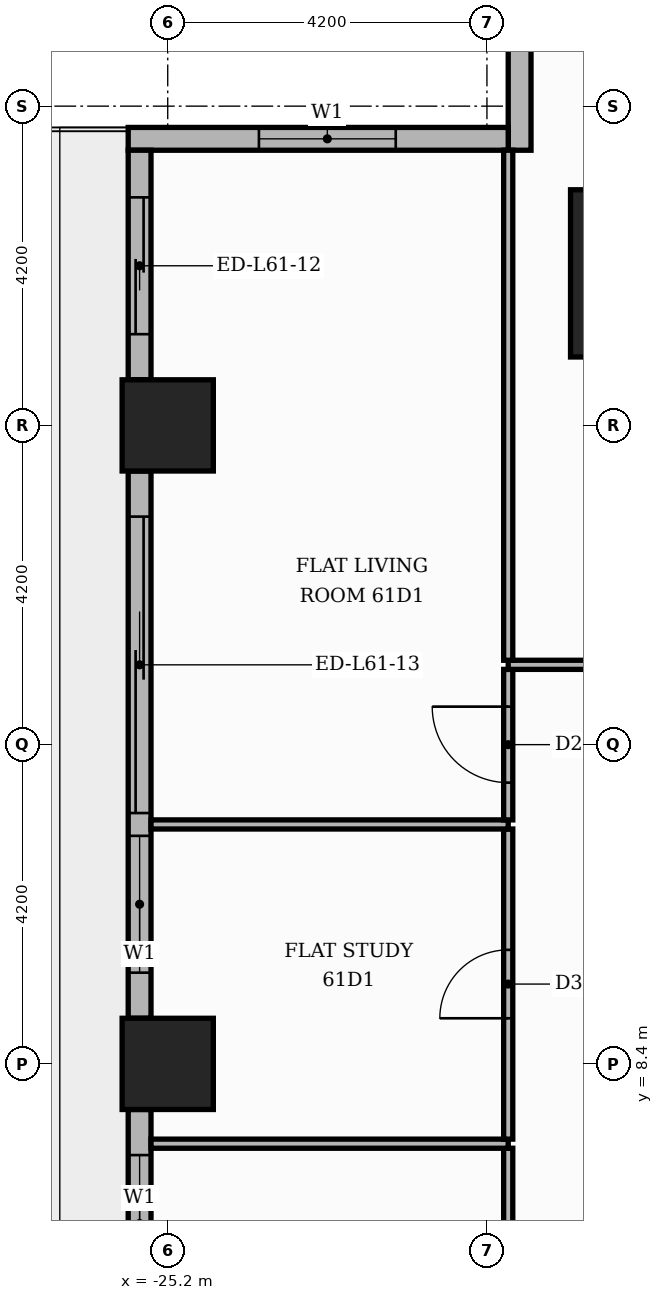
"""IFC4 building model, lengths in metres.
Left out: names, types, materials, properties, quantities, classifications, styles, units other than length and angle.
Written with IfcOpenShell. Run it as: python <this file> out.ifc"""

import sys

from ifc_helpers import new_model, si_unit, direction, frame, frame_2d, origin, origin_2d, place, context, subcontext, project, spatial, rectangle, extrude, element, fill, save


model = new_model("IFC4")
c1 = context("Model", 3, precision=1e-05, world=origin(), true_north=direction((0.0, 1.0)))
c2 = subcontext(c1, "Body", "Model", "MODEL_VIEW")
j1 = project(units=[si_unit("LENGTHUNIT", "METRE"), si_unit("PLANEANGLEUNIT", "RADIAN")], contexts=[c1])
p1 = place(None, origin())
s1 = spatial("IfcSite", under=j1, at=p1, CompositionType="ELEMENT")
p2 = place(p1, origin())
s2 = spatial("IfcBuilding", under=s1, at=p2, CompositionType="ELEMENT")
p3 = place(p2, frame((0.0, 0.0, 256.2)))
s3 = spatial("IfcBuildingStorey", under=s2, at=p3, CompositionType="ELEMENT", Elevation=256.2)
p4 = place(p3, frame((-18.8, 18.8, 0.0), z_axis=(0.0, 0.0, 1.0), x_axis=(1.0, 0.0, 0.0)))
e1 = element("IfcColumn", 1, at=p4, inside=s3, PredefinedType="COLUMN", context=c2, shape_type="SweptSolid", body=[
    extrude(rectangle(XDim=2.2, YDim=2.2, at=origin_2d()), origin(), (0.0, 0.0, 1.0), 3.9),
])
for number, where, z_axis, x_axis in (
    (2, (-25.2, 8.4, 0.0), (0.0, 0.0, 1.0), (1.0, 0.0, 0.0)),
    (3, (-25.2, 16.8, 0.0), (0.0, 0.0, 1.0), (1.0, 0.0, 0.0)),
):
    element("IfcColumn", number, at=place(p3, frame(where, z_axis=z_axis, x_axis=x_axis)), inside=s3, PredefinedType="COLUMN", context=c2, shape_type="SweptSolid", body=[
        extrude(rectangle(XDim=1.2, YDim=1.2, at=origin_2d()), origin(), (0.0, 0.0, 1.0), 3.9),
    ])
p5 = place(p3, frame((-20.57, 25.42, 0.0), z_axis=(0.0, 0.0, 1.0), x_axis=(0.0, -1.0, 0.0)))
e4 = element("IfcWall", 4, at=p5, inside=s3, PredefinedType="STANDARD", context=c2, shape_type="SweptSolid", body=[
    extrude(rectangle(XDim=5.0, YDim=0.3, at=frame_2d((2.5, 0.0))), origin(), (0.0, 0.0, 1.0), 3.48),
])
p6 = place(p5, frame((1.42, 0.0, 0.9)))
e5 = element("IfcOpeningElement", 5, at=p6, cuts=e4, PredefinedType="OPENING", context=c2, shape_type="SweptSolid", body=[
    extrude(rectangle(XDim=1.8, YDim=2.1, at=frame_2d((0.9, 1.05))), frame((0.0, 0.16, 0.0), z_axis=(0.0, -1.0, 0.0), x_axis=(1.0, 0.0, 0.0)), (0.0, 0.0, 1.0), 0.32),
])
p7 = place(p3, frame((-20.72, 20.57, 0.0), z_axis=(0.0, 0.0, 1.0), x_axis=(-1.0, 0.0, 0.0)))
e6 = element("IfcWall", 6, at=p7, inside=s3, PredefinedType="STANDARD", context=c2, shape_type="SweptSolid", body=[
    extrude(rectangle(XDim=5.0, YDim=0.3, at=frame_2d((2.5, 0.0))), origin(), (0.0, 0.0, 1.0), 3.48),
])
p8 = place(p7, frame((1.48, 0.0, 0.9)))
e7 = element("IfcOpeningElement", 7, at=p8, cuts=e6, PredefinedType="OPENING", context=c2, shape_type="SweptSolid", body=[
    extrude(rectangle(XDim=1.8, YDim=2.1, at=frame_2d((0.9, 1.05))), frame((0.0, 0.16, 0.0), z_axis=(0.0, -1.0, 0.0), x_axis=(1.0, 0.0, 0.0)), (0.0, 0.0, 1.0), 0.32),
])
p9 = place(p3, frame((-25.57, 20.42, 0.0), z_axis=(0.0, 0.0, 1.0), x_axis=(0.0, -1.0, 0.0)))
e8 = element("IfcWall", 8, at=p9, inside=s3, PredefinedType="STANDARD", context=c2, shape_type="SweptSolid", body=[
    extrude(rectangle(XDim=3.02, YDim=0.3, at=frame_2d((1.51, 0.0))), origin(), (0.0, 0.0, 1.0), 3.48),
])
p10 = place(p9, frame((0.62, 0.0, 0.0)))
e9 = element("IfcOpeningElement", 9, at=p10, cuts=e8, PredefinedType="OPENING", context=c2, shape_type="SweptSolid", body=[
    extrude(rectangle(XDim=1.8, YDim=2.4, at=frame_2d((0.9, 1.2))), frame((0.0, 0.16, 0.0), z_axis=(0.0, -1.0, 0.0), x_axis=(1.0, 0.0, 0.0)), (0.0, 0.0, 1.0), 0.32),
])
p11 = place(p3, frame((-25.57, 16.2, 0.0), z_axis=(0.0, 0.0, 1.0), x_axis=(0.0, -1.0, 0.0)))
e10 = element("IfcWall", 10, at=p11, inside=s3, PredefinedType="STANDARD", context=c2, shape_type="SweptSolid", body=[
    extrude(rectangle(XDim=7.2, YDim=0.3, at=frame_2d((3.6, 0.0))), origin(), (0.0, 0.0, 1.0), 3.48),
])
p12 = place(p11, frame((0.6, 0.0, 0.0)))
e11 = element("IfcOpeningElement", 11, at=p12, cuts=e10, PredefinedType="OPENING", context=c2, shape_type="SweptSolid", body=[
    extrude(rectangle(XDim=3.9, YDim=2.4, at=frame_2d((1.95, 1.2))), frame((0.0, 0.16, 0.0), z_axis=(0.0, -1.0, 0.0), x_axis=(1.0, 0.0, 0.0)), (0.0, 0.0, 1.0), 0.32),
])
p13 = place(p11, frame((4.8, 0.0, 0.9)))
e12 = element("IfcOpeningElement", 12, at=p13, cuts=e10, PredefinedType="OPENING", context=c2, shape_type="SweptSolid", body=[
    extrude(rectangle(XDim=1.8, YDim=2.1, at=frame_2d((0.9, 1.05))), frame((0.0, 0.16, 0.0), z_axis=(0.0, -1.0, 0.0), x_axis=(1.0, 0.0, 0.0)), (0.0, 0.0, 1.0), 0.32),
])
p14 = place(p3, frame((-25.57, 7.8, 0.0), z_axis=(0.0, 0.0, 1.0), x_axis=(0.0, -1.0, 0.0)))
e13 = element("IfcWall", 13, at=p14, inside=s3, PredefinedType="STANDARD", context=c2, shape_type="SweptSolid", body=[
    extrude(rectangle(XDim=7.2, YDim=0.3, at=frame_2d((3.6, 0.0))), origin(), (0.0, 0.0, 1.0), 3.48),
])
p15 = place(p14, frame((0.6, 0.0, 0.9)))
e14 = element("IfcOpeningElement", 14, at=p15, cuts=e13, PredefinedType="OPENING", context=c2, shape_type="SweptSolid", body=[
    extrude(rectangle(XDim=1.8, YDim=2.1, at=frame_2d((0.9, 1.05))), frame((0.0, 0.16, 0.0), z_axis=(0.0, -1.0, 0.0), x_axis=(1.0, 0.0, 0.0)), (0.0, 0.0, 1.0), 0.32),
])
p16 = place(p14, frame((2.7, 0.0, 0.0)))
e15 = element("IfcOpeningElement", 15, at=p16, cuts=e13, PredefinedType="OPENING", context=c2, shape_type="SweptSolid", body=[
    extrude(rectangle(XDim=1.8, YDim=2.4, at=frame_2d((0.9, 1.2))), frame((0.0, 0.16, 0.0), z_axis=(0.0, -1.0, 0.0), x_axis=(1.0, 0.0, 0.0)), (0.0, 0.0, 1.0), 0.32),
])
p17 = place(p14, frame((4.8, 0.0, 0.9)))
e16 = element("IfcOpeningElement", 16, at=p17, cuts=e13, PredefinedType="OPENING", context=c2, shape_type="SweptSolid", body=[
    extrude(rectangle(XDim=1.8, YDim=2.1, at=frame_2d((0.9, 1.05))), frame((0.0, 0.16, 0.0), z_axis=(0.0, -1.0, 0.0), x_axis=(1.0, 0.0, 0.0)), (0.0, 0.0, 1.0), 0.32),
])
p18 = place(p3, frame((-20.72, 3.21, 0.0), z_axis=(0.0, 0.0, 1.0), x_axis=(0.0, 1.0, 0.0)))
e17 = element("IfcWall", 17, at=p18, inside=s3, PredefinedType="PARTITIONING", context=c2, shape_type="SweptSolid", body=[
    extrude(rectangle(XDim=4.08, YDim=0.12, at=frame_2d((2.04, 0.0))), origin(), (0.0, 0.0, 1.0), 3.48),
])
p19 = place(p18, frame((1.59, 0.0, 0.0)))
e18 = element("IfcOpeningElement", 18, at=p19, cuts=e17, PredefinedType="OPENING", context=c2, shape_type="SweptSolid", body=[
    extrude(rectangle(XDim=0.9, YDim=2.1, at=frame_2d((0.45, 1.05))), frame((0.0, 0.07, 0.0), z_axis=(0.0, -1.0, 0.0), x_axis=(1.0, 0.0, 0.0)), (0.0, 0.0, 1.0), 0.14),
])
p20 = place(p3, frame((-25.42, 7.35, 0.0), z_axis=(0.0, 0.0, 1.0), x_axis=(1.0, 0.0, 0.0)))
e19 = element("IfcWall", 19, at=p20, inside=s3, PredefinedType="PARTITIONING", context=c2, shape_type="SweptSolid", body=[
    extrude(rectangle(XDim=4.7, YDim=0.12, at=frame_2d((2.35, 0.0))), origin(), (0.0, 0.0, 1.0), 3.48),
])
p21 = place(p3, frame((-20.72, 7.41, 0.0), z_axis=(0.0, 0.0, 1.0), x_axis=(0.0, 1.0, 0.0)))
e20 = element("IfcWall", 20, at=p21, inside=s3, PredefinedType="PARTITIONING", context=c2, shape_type="SweptSolid", body=[
    extrude(rectangle(XDim=4.08, YDim=0.12, at=frame_2d((2.04, 0.0))), origin(), (0.0, 0.0, 1.0), 3.48),
])
p22 = place(p21, frame((1.59, 0.0, 0.0)))
e21 = element("IfcOpeningElement", 21, at=p22, cuts=e20, PredefinedType="OPENING", context=c2, shape_type="SweptSolid", body=[
    extrude(rectangle(XDim=0.9, YDim=2.1, at=frame_2d((0.45, 1.05))), frame((0.0, 0.07, 0.0), z_axis=(0.0, -1.0, 0.0), x_axis=(1.0, 0.0, 0.0)), (0.0, 0.0, 1.0), 0.14),
])
p23 = place(p3, frame((-25.42, 11.55, 0.0), z_axis=(0.0, 0.0, 1.0), x_axis=(1.0, 0.0, 0.0)))
e22 = element("IfcWall", 22, at=p23, inside=s3, PredefinedType="PARTITIONING", context=c2, shape_type="SweptSolid", body=[
    extrude(rectangle(XDim=4.7, YDim=0.12, at=frame_2d((2.35, 0.0))), origin(), (0.0, 0.0, 1.0), 3.48),
])
p24 = place(p3, frame((-20.72, 11.61, 0.0), z_axis=(0.0, 0.0, 1.0), x_axis=(0.0, 1.0, 0.0)))
e23 = element("IfcWall", 23, at=p24, inside=s3, PredefinedType="PARTITIONING", context=c2, shape_type="SweptSolid", body=[
    extrude(rectangle(XDim=1.98, YDim=0.12, at=frame_2d((0.99, 0.0))), origin(), (0.0, 0.0, 1.0), 3.48),
])
p25 = place(p24, frame((0.49, 0.0, 0.0)))
e24 = element("IfcOpeningElement", 24, at=p25, cuts=e23, PredefinedType="OPENING", context=c2, shape_type="SweptSolid", body=[
    extrude(rectangle(XDim=1.0, YDim=2.1, at=frame_2d((0.5, 1.05))), frame((0.0, 0.07, 0.0), z_axis=(0.0, -1.0, 0.0), x_axis=(1.0, 0.0, 0.0)), (0.0, 0.0, 1.0), 0.14),
])
p26 = place(p3, frame((-20.72, 13.65, 0.0), z_axis=(0.0, 0.0, 1.0), x_axis=(1.0, 0.0, 0.0)))
e25 = element("IfcWall", 25, at=p26, inside=s3, PredefinedType="PARTITIONING", context=c2, shape_type="SweptSolid", body=[
    extrude(rectangle(XDim=7.07, YDim=0.12, at=frame_2d((3.535, 0.0))), origin(), (0.0, 0.0, 1.0), 3.48),
])
p27 = place(p26, frame((3.085, 0.0, 0.0)))
e26 = element("IfcOpeningElement", 26, at=p27, cuts=e25, PredefinedType="OPENING", context=c2, shape_type="SweptSolid", body=[
    extrude(rectangle(XDim=0.9, YDim=2.1, at=frame_2d((0.45, 1.05))), frame((0.0, 0.07, 0.0), z_axis=(0.0, -1.0, 0.0), x_axis=(1.0, 0.0, 0.0)), (0.0, 0.0, 1.0), 0.14),
])
p28 = place(p3, frame((-20.72, 13.71, 0.0), z_axis=(0.0, 0.0, 1.0), x_axis=(0.0, 1.0, 0.0)))
e27 = element("IfcWall", 27, at=p28, inside=s3, PredefinedType="PARTITIONING", context=c2, shape_type="SweptSolid", body=[
    extrude(rectangle(XDim=6.71, YDim=0.12, at=frame_2d((3.355, 0.0))), origin(), (0.0, 0.0, 1.0), 3.48),
])
p29 = place(p8, origin())
e28 = element("IfcWindow", 28, at=p29, inside=s3, PartitioningType="SINGLE_PANEL", PredefinedType="WINDOW", context=c2, shape_type="SweptSolid", body=[
    extrude(rectangle(XDim=1.8, YDim=2.1, at=frame_2d((0.9, 1.05))), frame((0.0, 0.03, 0.0), z_axis=(0.0, -1.0, 0.0), x_axis=(1.0, 0.0, 0.0)), (0.0, 0.0, 1.0), 0.06),
])
fill(e7, e28)
p30 = place(p10, origin())
e29 = element("IfcDoor", 29, at=p30, inside=s3, OperationType="SLIDING_TO_RIGHT", PredefinedType="DOOR", context=c2, shape_type="SweptSolid", body=[
    extrude(rectangle(XDim=1.8, YDim=2.4, at=frame_2d((0.9, 1.2))), frame((0.0, 0.025, 0.0), z_axis=(0.0, -1.0, 0.0), x_axis=(1.0, 0.0, 0.0)), (0.0, 0.0, 1.0), 0.05),
])
fill(e9, e29)
p31 = place(p12, origin())
e30 = element("IfcDoor", 30, at=p31, inside=s3, OperationType="SLIDING_TO_LEFT", PredefinedType="DOOR", context=c2, shape_type="SweptSolid", body=[
    extrude(rectangle(XDim=3.9, YDim=2.4, at=frame_2d((1.95, 1.2))), frame((0.0, 0.025, 0.0), z_axis=(0.0, -1.0, 0.0), x_axis=(1.0, 0.0, 0.0)), (0.0, 0.0, 1.0), 0.05),
])
fill(e11, e30)
p32 = place(p13, origin())
e31 = element("IfcWindow", 31, at=p32, inside=s3, PartitioningType="SINGLE_PANEL", PredefinedType="WINDOW", context=c2, shape_type="SweptSolid", body=[
    extrude(rectangle(XDim=1.8, YDim=2.1, at=frame_2d((0.9, 1.05))), frame((0.0, 0.03, 0.0), z_axis=(0.0, -1.0, 0.0), x_axis=(1.0, 0.0, 0.0)), (0.0, 0.0, 1.0), 0.06),
])
fill(e12, e31)
p33 = place(p15, origin())
e32 = element("IfcWindow", 32, at=p33, inside=s3, PartitioningType="SINGLE_PANEL", PredefinedType="WINDOW", context=c2, shape_type="SweptSolid", body=[
    extrude(rectangle(XDim=1.8, YDim=2.1, at=frame_2d((0.9, 1.05))), frame((0.0, 0.03, 0.0), z_axis=(0.0, -1.0, 0.0), x_axis=(1.0, 0.0, 0.0)), (0.0, 0.0, 1.0), 0.06),
])
fill(e14, e32)
p34 = place(p25, origin())
e33 = element("IfcDoor", 33, at=p34, inside=s3, OperationType="SINGLE_SWING_RIGHT", PredefinedType="DOOR", context=c2, shape_type="SweptSolid", body=[
    extrude(rectangle(XDim=1.0, YDim=2.1, at=frame_2d((0.5, 1.05))), frame((0.0, 0.025, 0.0), z_axis=(0.0, -1.0, 0.0), x_axis=(1.0, 0.0, 0.0)), (0.0, 0.0, 1.0), 0.05),
])
fill(e24, e33)
p35 = place(p22, origin())
e34 = element("IfcDoor", 34, at=p35, inside=s3, OperationType="SINGLE_SWING_LEFT", PredefinedType="DOOR", context=c2, shape_type="SweptSolid", body=[
    extrude(rectangle(XDim=0.9, YDim=2.1, at=frame_2d((0.45, 1.05))), frame((0.0, 0.025, 0.0), z_axis=(0.0, -1.0, 0.0), x_axis=(1.0, 0.0, 0.0)), (0.0, 0.0, 1.0), 0.05),
])
fill(e21, e34)
save(model, sys.argv[1])
